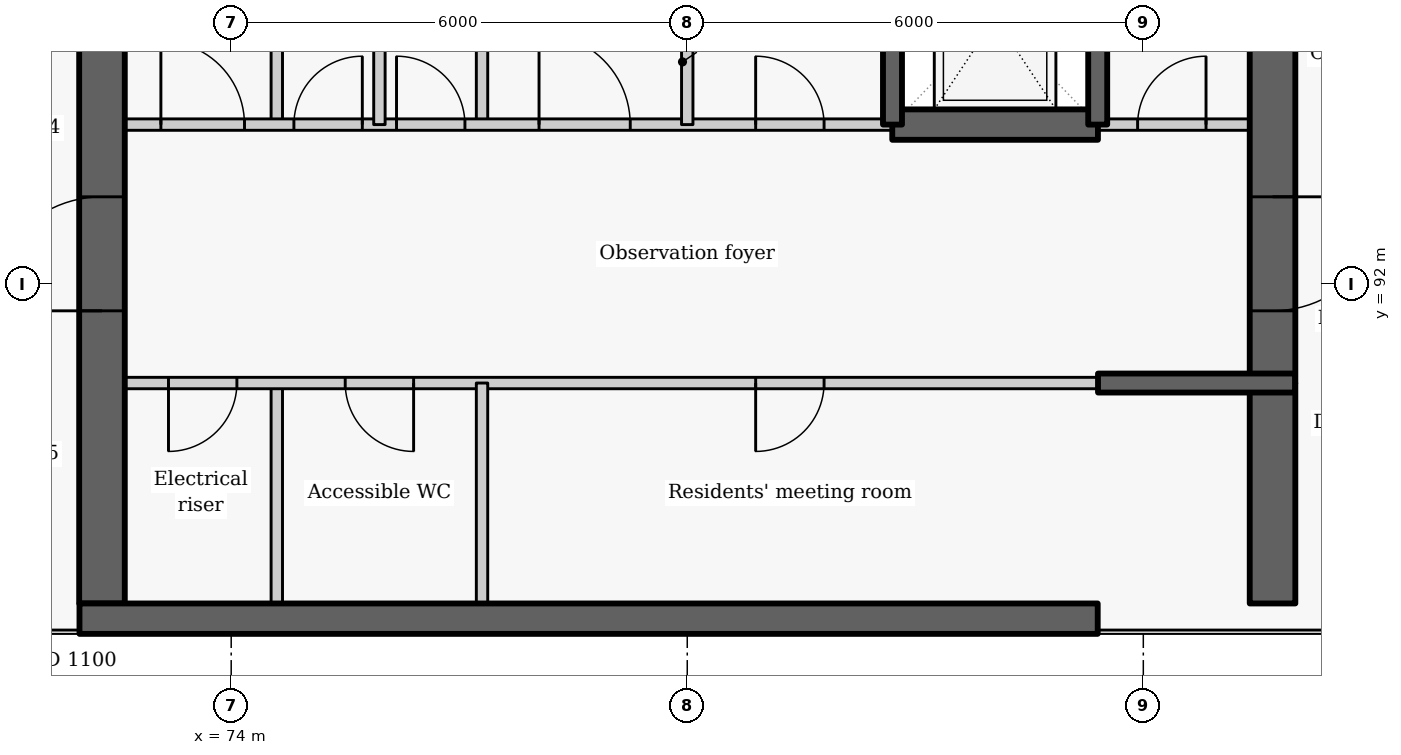
"""IFC4 building model, lengths in metres.
Left out: names, types, materials, properties, quantities, classifications, styles, units other than length and angle.
Written with IfcOpenShell. Run it as: python <this file> out.ifc"""

import sys

from ifc_helpers import new_model, si_unit, direction, frame, frame_2d, origin, place, context, subcontext, project, spatial, rectangle, extrude, element, fill, save


model = new_model("IFC4")
c1 = context("Model", 3, precision=1e-05, world=origin(), true_north=direction((0.0, 1.0)))
c2 = subcontext(c1, "Body", "Model", "MODEL_VIEW")
j1 = project(units=[si_unit("LENGTHUNIT", "METRE"), si_unit("PLANEANGLEUNIT", "RADIAN")], contexts=[c1])
p1 = place(None, origin())
s1 = spatial("IfcSite", under=j1, at=p1, CompositionType="ELEMENT")
p2 = place(p1, origin())
s2 = spatial("IfcBuilding", under=s1, at=p2, CompositionType="ELEMENT")
p3 = place(p2, frame((0.0, 0.0, 283.2)))
s3 = spatial("IfcBuildingStorey", under=s2, at=p3, CompositionType="ELEMENT", Elevation=283.2)
p4 = place(p3, frame((74.6, 87.8, 0.0), z_axis=(0.0, 0.0, 1.0), x_axis=(0.0, 1.0, 0.0)))
e1 = element("IfcWall", 1, at=p4, inside=s3, PredefinedType="PARTITIONING", context=c2, shape_type="SweptSolid", body=[
    extrude(rectangle(XDim=2.9, YDim=0.15, at=frame_2d((1.45, 0.0))), origin(), (0.0, 0.0, 1.0), 3.325),
])
p5 = place(p3, frame((74.6, 94.1, 0.0), z_axis=(0.0, 0.0, 1.0), x_axis=(0.0, 1.0, 0.0)))
e2 = element("IfcWall", 2, at=p5, inside=s3, PredefinedType="PARTITIONING", context=c2, shape_type="SweptSolid", body=[
    extrude(rectangle(XDim=2.8, YDim=0.15, at=frame_2d((1.4, 0.0))), origin(), (0.0, 0.0, 1.0), 3.325),
])
p6 = place(p3, frame((85.4, 90.7, 0.0), z_axis=(0.0, 0.0, 1.0), x_axis=(-1.0, 0.0, 0.0)))
e3 = element("IfcWall", 3, at=p6, inside=s3, PredefinedType="PARTITIONING", context=c2, shape_type="SweptSolid", body=[
    extrude(rectangle(XDim=13.4, YDim=0.15, at=frame_2d((6.7, 0.0))), origin(), (0.0, 0.0, 1.0), 3.325),
])
p7 = place(p6, frame((11.325, 0.0, 0.0)))
e4 = element("IfcOpeningElement", 4, at=p7, cuts=e3, PredefinedType="OPENING", context=c2, shape_type="SweptSolid", body=[
    extrude(rectangle(XDim=0.9, YDim=2.1, at=frame_2d((0.45, 1.05))), frame((0.0, 0.085, 0.0), z_axis=(0.0, -1.0, 0.0), x_axis=(1.0, 0.0, 0.0)), (0.0, 0.0, 1.0), 0.17),
])
p8 = place(p6, frame((9.0, 0.0, 0.0)))
e5 = element("IfcOpeningElement", 5, at=p8, cuts=e3, PredefinedType="OPENING", context=c2, shape_type="SweptSolid", body=[
    extrude(rectangle(XDim=0.9, YDim=2.1, at=frame_2d((0.45, 1.05))), frame((0.0, 0.085, 0.0), z_axis=(0.0, -1.0, 0.0), x_axis=(1.0, 0.0, 0.0)), (0.0, 0.0, 1.0), 0.17),
])
p9 = place(p6, frame((3.6, 0.0, 0.0)))
e6 = element("IfcOpeningElement", 6, at=p9, cuts=e3, PredefinedType="OPENING", context=c2, shape_type="SweptSolid", body=[
    extrude(rectangle(XDim=0.9, YDim=2.1, at=frame_2d((0.45, 1.05))), frame((0.0, 0.085, 0.0), z_axis=(0.0, -1.0, 0.0), x_axis=(1.0, 0.0, 0.0)), (0.0, 0.0, 1.0), 0.17),
])
p10 = place(p3, frame((72.3, 87.8, -0.275), z_axis=(0.0, 0.0, 1.0), x_axis=(0.0, 1.0, 0.0)))
e7 = element("IfcWall", 7, at=p10, inside=s3, PredefinedType="SHEAR", context=c2, shape_type="SweptSolid", body=[
    extrude(rectangle(XDim=9.1, YDim=0.6, at=frame_2d((4.55, 0.0))), origin(), (0.0, 0.0, 1.0), 3.6),
])
p11 = place(p10, frame((3.85, 0.0, 0.275)))
e8 = element("IfcOpeningElement", 8, at=p11, cuts=e7, PredefinedType="OPENING", context=c2, shape_type="SweptSolid", body=[
    extrude(rectangle(XDim=1.5, YDim=2.1, at=frame_2d((0.75, 1.05))), frame((0.0, 0.31, 0.0), z_axis=(0.0, -1.0, 0.0), x_axis=(1.0, 0.0, 0.0)), (0.0, 0.0, 1.0), 0.62),
])
p12 = place(p3, frame((77.3, 87.8, 0.0), z_axis=(0.0, 0.0, 1.0), x_axis=(0.0, 1.0, 0.0)))
e9 = element("IfcWall", 9, at=p12, inside=s3, PredefinedType="PARTITIONING", context=c2, shape_type="SweptSolid", body=[
    extrude(rectangle(XDim=2.9, YDim=0.15, at=frame_2d((1.45, 0.0))), origin(), (0.0, 0.0, 1.0), 3.325),
])
p13 = place(p3, frame((77.3, 94.1, 0.0), z_axis=(0.0, 0.0, 1.0), x_axis=(0.0, 1.0, 0.0)))
e10 = element("IfcWall", 10, at=p13, inside=s3, PredefinedType="PARTITIONING", context=c2, shape_type="SweptSolid", body=[
    extrude(rectangle(XDim=2.8, YDim=0.15, at=frame_2d((1.4, 0.0))), origin(), (0.0, 0.0, 1.0), 3.325),
])
p14 = place(p3, frame((72.0, 94.1, 0.0), z_axis=(0.0, 0.0, 1.0), x_axis=(1.0, 0.0, 0.0)))
e11 = element("IfcWall", 11, at=p14, inside=s3, PredefinedType="PARTITIONING", context=c2, shape_type="SweptSolid", body=[
    extrude(rectangle(XDim=10.703, YDim=0.15, at=frame_2d((5.352, 0.0))), origin(), (0.0, 0.0, 1.0), 3.325),
])
p15 = place(p14, frame((1.075, 0.0, 0.0)))
e12 = element("IfcOpeningElement", 12, at=p15, cuts=e11, PredefinedType="OPENING", context=c2, shape_type="SweptSolid", body=[
    extrude(rectangle(XDim=1.1, YDim=2.1, at=frame_2d((0.55, 1.05))), frame((0.0, 0.085, 0.0), z_axis=(0.0, -1.0, 0.0), x_axis=(1.0, 0.0, 0.0)), (0.0, 0.0, 1.0), 0.17),
])
p16 = place(p14, frame((2.825, 0.0, 0.0)))
e13 = element("IfcOpeningElement", 13, at=p16, cuts=e11, PredefinedType="OPENING", context=c2, shape_type="SweptSolid", body=[
    extrude(rectangle(XDim=0.9, YDim=2.1, at=frame_2d((0.45, 1.05))), frame((0.0, 0.085, 0.0), z_axis=(0.0, -1.0, 0.0), x_axis=(1.0, 0.0, 0.0)), (0.0, 0.0, 1.0), 0.17),
])
p17 = place(p14, frame((4.175, 0.0, 0.0)))
e14 = element("IfcOpeningElement", 14, at=p17, cuts=e11, PredefinedType="OPENING", context=c2, shape_type="SweptSolid", body=[
    extrude(rectangle(XDim=0.9, YDim=2.1, at=frame_2d((0.45, 1.05))), frame((0.0, 0.085, 0.0), z_axis=(0.0, -1.0, 0.0), x_axis=(1.0, 0.0, 0.0)), (0.0, 0.0, 1.0), 0.17),
])
p18 = place(p14, frame((6.05, 0.0, 0.0)))
e15 = element("IfcOpeningElement", 15, at=p18, cuts=e11, PredefinedType="OPENING", context=c2, shape_type="SweptSolid", body=[
    extrude(rectangle(XDim=1.2, YDim=2.1, at=frame_2d((0.6, 1.05))), frame((0.0, 0.085, 0.0), z_axis=(0.0, -1.0, 0.0), x_axis=(1.0, 0.0, 0.0)), (0.0, 0.0, 1.0), 0.17),
])
p19 = place(p14, frame((8.9, 0.0, 0.0)))
e16 = element("IfcOpeningElement", 16, at=p19, cuts=e11, PredefinedType="OPENING", context=c2, shape_type="SweptSolid", body=[
    extrude(rectangle(XDim=0.9, YDim=2.1, at=frame_2d((0.45, 1.05))), frame((0.0, 0.085, 0.0), z_axis=(0.0, -1.0, 0.0), x_axis=(1.0, 0.0, 0.0)), (0.0, 0.0, 1.0), 0.17),
])
p20 = place(p3, frame((85.397, 94.1, 0.0), z_axis=(0.0, 0.0, 1.0), x_axis=(1.0, 0.0, 0.0)))
e17 = element("IfcWall", 17, at=p20, inside=s3, PredefinedType="PARTITIONING", context=c2, shape_type="SweptSolid", body=[
    extrude(rectangle(XDim=2.603, YDim=0.15, at=frame_2d((1.302, 0.0))), origin(), (0.0, 0.0, 1.0), 3.325),
])
p21 = place(p20, frame((0.528, 0.0, 0.0)))
e18 = element("IfcOpeningElement", 18, at=p21, cuts=e17, PredefinedType="OPENING", context=c2, shape_type="SweptSolid", body=[
    extrude(rectangle(XDim=0.9, YDim=2.1, at=frame_2d((0.45, 1.05))), frame((0.0, 0.085, 0.0), z_axis=(0.0, -1.0, 0.0), x_axis=(1.0, 0.0, 0.0)), (0.0, 0.0, 1.0), 0.17),
])
p22 = place(p3, frame((82.697, 94.1, -0.275), z_axis=(0.0, 0.0, 1.0), x_axis=(1.0, 0.0, 0.0)))
e19 = element("IfcWall", 19, at=p22, inside=s3, PredefinedType="SHEAR", context=c2, shape_type="SweptSolid", body=[
    extrude(rectangle(XDim=2.706, YDim=0.4, at=frame_2d((1.353, 0.0))), origin(), (0.0, 0.0, 1.0), 3.6),
])
p23 = place(p3, frame((87.7, 102.05, -0.275), z_axis=(0.0, 0.0, 1.0), x_axis=(0.0, -1.0, 0.0)))
e20 = element("IfcWall", 20, at=p23, inside=s3, PredefinedType="SHEAR", context=c2, shape_type="SweptSolid", body=[
    extrude(rectangle(XDim=11.35, YDim=0.6, at=frame_2d((5.675, 0.0))), origin(), (0.0, 0.0, 1.0), 3.6),
])
p24 = place(p23, frame((8.9, 0.0, 0.275)))
e21 = element("IfcOpeningElement", 21, at=p24, cuts=e20, PredefinedType="OPENING", context=c2, shape_type="SweptSolid", body=[
    extrude(rectangle(XDim=1.5, YDim=2.1, at=frame_2d((0.75, 1.05))), frame((0.0, 0.31, 0.0), z_axis=(0.0, -1.0, 0.0), x_axis=(1.0, 0.0, 0.0)), (0.0, 0.0, 1.0), 0.62),
])
p25 = place(p23, frame((2.025, 0.0, 0.275)))
e22 = element("IfcOpeningElement", 22, at=p25, cuts=e20, PredefinedType="OPENING", context=c2, shape_type="SweptSolid", body=[
    extrude(rectangle(XDim=1.1, YDim=2.1, at=frame_2d((0.55, 1.05))), frame((0.0, 0.31, 0.0), z_axis=(0.0, -1.0, 0.0), x_axis=(1.0, 0.0, 0.0)), (0.0, 0.0, 1.0), 0.62),
])
for number, where, z_axis, x_axis in (
    (23, (75.95, 94.1, 0.0), (0.0, 0.0, 1.0), (0.0, 1.0, 0.0)),
    (24, (80.0, 94.1, 0.0), (0.0, 0.0, 1.0), (0.0, 1.0, 0.0)),
):
    element("IfcWall", number, at=place(p3, frame(where, z_axis=z_axis, x_axis=x_axis)), inside=s3, PredefinedType="PARTITIONING", context=c2, shape_type="SweptSolid", body=[
        extrude(rectangle(XDim=2.8, YDim=0.15, at=frame_2d((1.4, 0.0))), origin(), (0.0, 0.0, 1.0), 3.325),
    ])
for number, where, z_axis, x_axis in (
    (25, (82.7, 94.1, -0.275), (0.0, 0.0, 1.0), (0.0, 1.0, 0.0)),
    (26, (85.4, 94.1, -0.275), (0.0, 0.0, 1.0), (0.0, 1.0, 0.0)),
):
    element("IfcWall", number, at=place(p3, frame(where, z_axis=z_axis, x_axis=x_axis)), inside=s3, PredefinedType="SHEAR", context=c2, shape_type="SweptSolid", body=[
        extrude(rectangle(XDim=2.8, YDim=0.25, at=frame_2d((1.4, 0.0))), origin(), (0.0, 0.0, 1.0), 3.6),
    ])
p26 = place(p3, frame((72.004, 87.6, -0.275), z_axis=(0.0, 0.0, 1.0), x_axis=(1.0, 0.0, 0.0)))
e27 = element("IfcWall", 27, at=p26, inside=s3, PredefinedType="SHEAR", context=c2, shape_type="SweptSolid", body=[
    extrude(rectangle(XDim=13.396, YDim=0.4, at=frame_2d((6.698, 0.0))), origin(), (0.0, 0.0, 1.0), 3.6),
])
p27 = place(p3, frame((87.7, 87.8, -0.275), z_axis=(0.0, 0.0, 1.0), x_axis=(0.0, 1.0, 0.0)))
e28 = element("IfcWall", 28, at=p27, inside=s3, PredefinedType="SHEAR", context=c2, shape_type="SweptSolid", body=[
    extrude(rectangle(XDim=2.896, YDim=0.6, at=frame_2d((1.448, 0.0))), origin(), (0.0, 0.0, 1.0), 3.6),
])
p28 = place(p3, frame((85.404, 90.7, -0.275), z_axis=(0.0, 0.0, 1.0), x_axis=(1.0, 0.0, 0.0)))
e29 = element("IfcWall", 29, at=p28, inside=s3, PredefinedType="SHEAR", context=c2, shape_type="SweptSolid", body=[
    extrude(rectangle(XDim=2.592, YDim=0.25, at=frame_2d((1.296, 0.0))), origin(), (0.0, 0.0, 1.0), 3.6),
])
p29 = place(p7, origin())
e30 = element("IfcDoor", 30, at=p29, inside=s3, OperationType="SINGLE_SWING_RIGHT", PredefinedType="DOOR", context=c2, shape_type="SweptSolid", body=[
    extrude(rectangle(XDim=0.9, YDim=2.1, at=frame_2d((0.45, 1.05))), frame((0.0, 0.025, 0.0), z_axis=(0.0, -1.0, 0.0), x_axis=(1.0, 0.0, 0.0)), (0.0, 0.0, 1.0), 0.05),
])
fill(e4, e30)
p30 = place(p8, origin())
e31 = element("IfcDoor", 31, at=p30, inside=s3, OperationType="SINGLE_SWING_LEFT", PredefinedType="DOOR", context=c2, shape_type="SweptSolid", body=[
    extrude(rectangle(XDim=0.9, YDim=2.1, at=frame_2d((0.45, 1.05))), frame((0.0, 0.025, 0.0), z_axis=(0.0, -1.0, 0.0), x_axis=(1.0, 0.0, 0.0)), (0.0, 0.0, 1.0), 0.05),
])
fill(e5, e31)
p31 = place(p9, origin())
e32 = element("IfcDoor", 32, at=p31, inside=s3, OperationType="SINGLE_SWING_RIGHT", PredefinedType="DOOR", context=c2, shape_type="SweptSolid", body=[
    extrude(rectangle(XDim=0.9, YDim=2.1, at=frame_2d((0.45, 1.05))), frame((0.0, 0.025, 0.0), z_axis=(0.0, -1.0, 0.0), x_axis=(1.0, 0.0, 0.0)), (0.0, 0.0, 1.0), 0.05),
])
fill(e6, e32)
p32 = place(p15, origin())
e33 = element("IfcDoor", 33, at=p32, inside=s3, OperationType="SINGLE_SWING_LEFT", PredefinedType="DOOR", context=c2, shape_type="SweptSolid", body=[
    extrude(rectangle(XDim=1.1, YDim=2.1, at=frame_2d((0.55, 1.05))), frame((0.0, 0.025, 0.0), z_axis=(0.0, -1.0, 0.0), x_axis=(1.0, 0.0, 0.0)), (0.0, 0.0, 1.0), 0.05),
])
fill(e12, e33)
p33 = place(p16, origin())
e34 = element("IfcDoor", 34, at=p33, inside=s3, OperationType="SINGLE_SWING_RIGHT", PredefinedType="DOOR", context=c2, shape_type="SweptSolid", body=[
    extrude(rectangle(XDim=0.9, YDim=2.1, at=frame_2d((0.45, 1.05))), frame((0.0, 0.025, 0.0), z_axis=(0.0, -1.0, 0.0), x_axis=(1.0, 0.0, 0.0)), (0.0, 0.0, 1.0), 0.05),
])
fill(e13, e34)
p34 = place(p17, origin())
e35 = element("IfcDoor", 35, at=p34, inside=s3, OperationType="SINGLE_SWING_LEFT", PredefinedType="DOOR", context=c2, shape_type="SweptSolid", body=[
    extrude(rectangle(XDim=0.9, YDim=2.1, at=frame_2d((0.45, 1.05))), frame((0.0, 0.025, 0.0), z_axis=(0.0, -1.0, 0.0), x_axis=(1.0, 0.0, 0.0)), (0.0, 0.0, 1.0), 0.05),
])
fill(e14, e35)
p35 = place(p18, origin())
e36 = element("IfcDoor", 36, at=p35, inside=s3, OperationType="DOUBLE_DOOR_SINGLE_SWING", PredefinedType="DOOR", context=c2, shape_type="SweptSolid", body=[
    extrude(rectangle(XDim=1.2, YDim=2.1, at=frame_2d((0.6, 1.05))), frame((0.0, 0.025, 0.0), z_axis=(0.0, -1.0, 0.0), x_axis=(1.0, 0.0, 0.0)), (0.0, 0.0, 1.0), 0.05),
])
fill(e15, e36)
p36 = place(p19, origin())
e37 = element("IfcDoor", 37, at=p36, inside=s3, OperationType="SINGLE_SWING_LEFT", PredefinedType="DOOR", context=c2, shape_type="SweptSolid", body=[
    extrude(rectangle(XDim=0.9, YDim=2.1, at=frame_2d((0.45, 1.05))), frame((0.0, 0.025, 0.0), z_axis=(0.0, -1.0, 0.0), x_axis=(1.0, 0.0, 0.0)), (0.0, 0.0, 1.0), 0.05),
])
fill(e16, e37)
p37 = place(p21, origin())
e38 = element("IfcDoor", 38, at=p37, inside=s3, OperationType="SINGLE_SWING_RIGHT", PredefinedType="DOOR", context=c2, shape_type="SweptSolid", body=[
    extrude(rectangle(XDim=0.9, YDim=2.1, at=frame_2d((0.45, 1.05))), frame((0.0, 0.025, 0.0), z_axis=(0.0, -1.0, 0.0), x_axis=(1.0, 0.0, 0.0)), (0.0, 0.0, 1.0), 0.05),
])
fill(e18, e38)
p38 = place(p24, origin())
e39 = element("IfcDoor", 39, at=p38, inside=s3, OperationType="DOUBLE_DOOR_SINGLE_SWING", PredefinedType="DOOR", context=c2, shape_type="SweptSolid", body=[
    extrude(rectangle(XDim=1.5, YDim=2.1, at=frame_2d((0.75, 1.05))), frame((0.0, 0.025, 0.0), z_axis=(0.0, -1.0, 0.0), x_axis=(1.0, 0.0, 0.0)), (0.0, 0.0, 1.0), 0.05),
])
fill(e21, e39)
p39 = place(p11, origin())
e40 = element("IfcDoor", 40, at=p39, inside=s3, OperationType="DOUBLE_DOOR_SINGLE_SWING", PredefinedType="DOOR", context=c2, shape_type="SweptSolid", body=[
    extrude(rectangle(XDim=1.5, YDim=2.1, at=frame_2d((0.75, 1.05))), frame((0.0, 0.025, 0.0), z_axis=(0.0, -1.0, 0.0), x_axis=(1.0, 0.0, 0.0)), (0.0, 0.0, 1.0), 0.05),
])
fill(e8, e40)
save(model, sys.argv[1])
